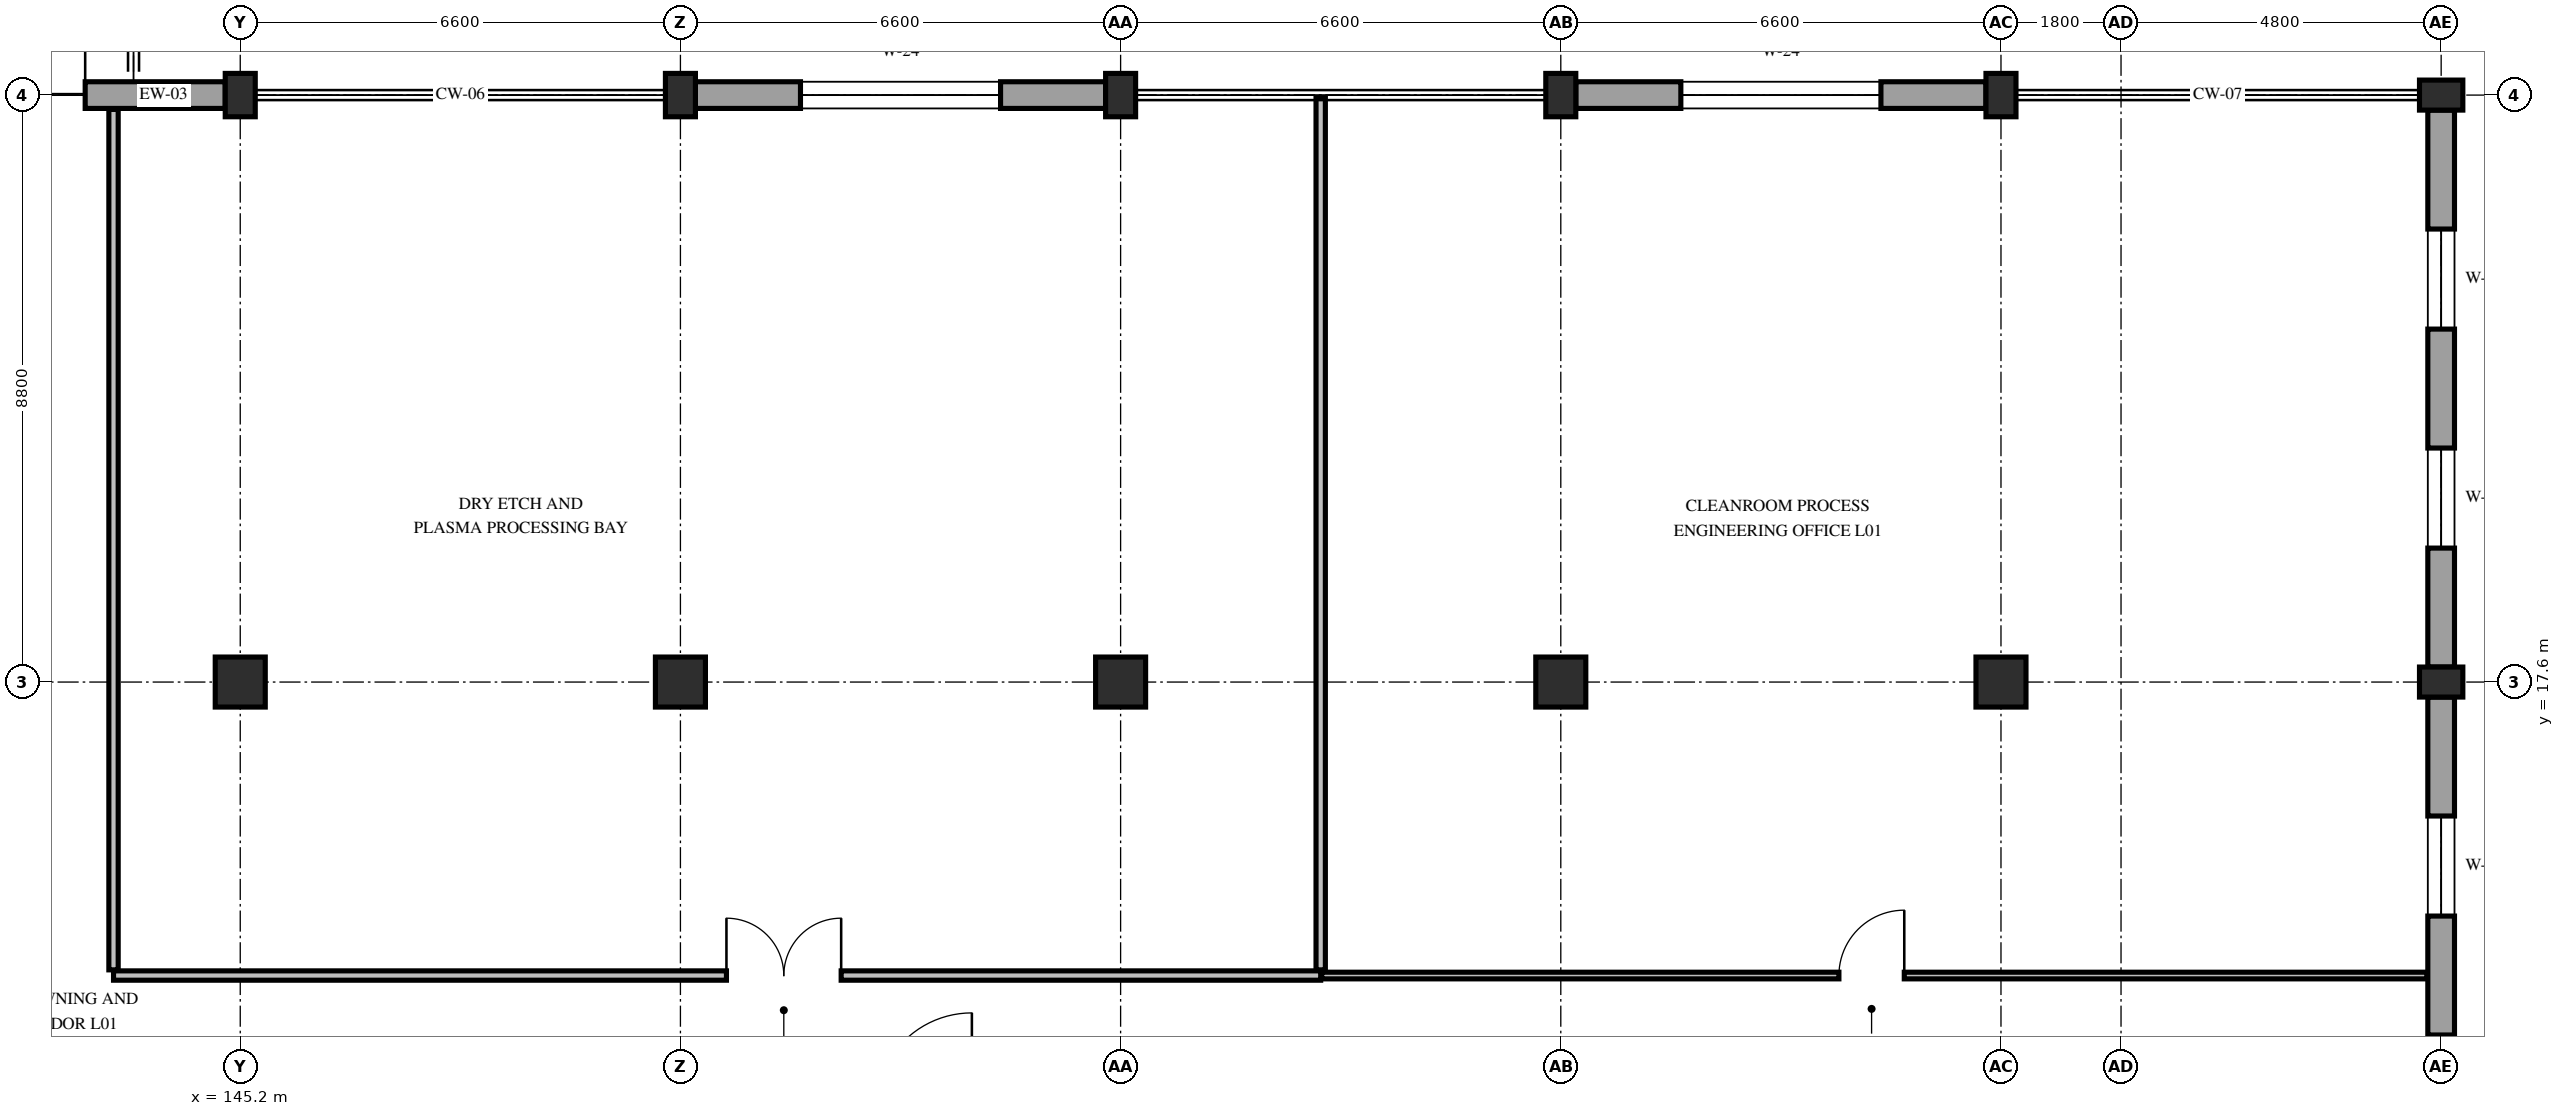
"""IFC4 building model, lengths in metres.
Left out: names, types, materials, properties, quantities, classifications, styles, units other than length and angle.
Written with IfcOpenShell. Run it as: python <this file> out.ifc"""

import sys

from ifc_helpers import new_model, si_unit, direction, frame, frame_2d, origin, origin_2d, place, context, subcontext, project, spatial, rectangle, extrude, element, fill, save


model = new_model("IFC4")
c1 = context("Model", 3, precision=1e-05, world=origin(), true_north=direction((0.0, 1.0)))
c2 = subcontext(c1, "Body", "Model", "MODEL_VIEW")
j1 = project(units=[si_unit("LENGTHUNIT", "METRE"), si_unit("PLANEANGLEUNIT", "RADIAN")], contexts=[c1])
p1 = place(None, origin())
s1 = spatial("IfcSite", under=j1, at=p1, CompositionType="ELEMENT")
p2 = place(p1, origin())
s2 = spatial("IfcBuilding", under=s1, at=p2, CompositionType="ELEMENT")
p3 = place(p2, frame((0.0, 0.0, 5.4)))
s3 = spatial("IfcBuildingStorey", under=s2, at=p3, CompositionType="ELEMENT", Elevation=5.4)
p4 = place(p3, frame((145.2, 17.6, 0.0), z_axis=(0.0, 0.0, 1.0), x_axis=(1.0, 0.0, 0.0)))
e1 = element("IfcColumn", 1, at=p4, inside=s3, PredefinedType="COLUMN", context=c2, shape_type="SweptSolid", body=[
    extrude(rectangle(XDim=0.75, YDim=0.75, at=origin_2d()), origin(), (0.0, 0.0, 1.0), 4.8),
])
p5 = place(p3, frame((145.2, 26.4, 0.0), z_axis=(0.0, 0.0, 1.0), x_axis=(1.0, 0.0, 0.0)))
e2 = element("IfcColumn", 2, at=p5, inside=s3, PredefinedType="PILASTER", context=c2, shape_type="SweptSolid", body=[
    extrude(rectangle(XDim=0.45, YDim=0.65, at=origin_2d()), origin(), (0.0, 0.0, 1.0), 4.8),
])
p6 = place(p3, frame((151.8, 17.6, 0.0), z_axis=(0.0, 0.0, 1.0), x_axis=(1.0, 0.0, 0.0)))
e3 = element("IfcColumn", 3, at=p6, inside=s3, PredefinedType="COLUMN", context=c2, shape_type="SweptSolid", body=[
    extrude(rectangle(XDim=0.75, YDim=0.75, at=origin_2d()), origin(), (0.0, 0.0, 1.0), 4.8),
])
p7 = place(p3, frame((151.8, 26.4, 0.0), z_axis=(0.0, 0.0, 1.0), x_axis=(1.0, 0.0, 0.0)))
e4 = element("IfcColumn", 4, at=p7, inside=s3, PredefinedType="PILASTER", context=c2, shape_type="SweptSolid", body=[
    extrude(rectangle(XDim=0.45, YDim=0.65, at=origin_2d()), origin(), (0.0, 0.0, 1.0), 4.8),
])
p8 = place(p3, frame((158.4, 17.6, 0.0), z_axis=(0.0, 0.0, 1.0), x_axis=(1.0, 0.0, 0.0)))
e5 = element("IfcColumn", 5, at=p8, inside=s3, PredefinedType="COLUMN", context=c2, shape_type="SweptSolid", body=[
    extrude(rectangle(XDim=0.75, YDim=0.75, at=origin_2d()), origin(), (0.0, 0.0, 1.0), 4.8),
])
p9 = place(p3, frame((158.4, 26.4, 0.0), z_axis=(0.0, 0.0, 1.0), x_axis=(1.0, 0.0, 0.0)))
e6 = element("IfcColumn", 6, at=p9, inside=s3, PredefinedType="PILASTER", context=c2, shape_type="SweptSolid", body=[
    extrude(rectangle(XDim=0.45, YDim=0.65, at=origin_2d()), origin(), (0.0, 0.0, 1.0), 4.8),
])
p10 = place(p3, frame((165.0, 17.6, 0.0), z_axis=(0.0, 0.0, 1.0), x_axis=(1.0, 0.0, 0.0)))
e7 = element("IfcColumn", 7, at=p10, inside=s3, PredefinedType="COLUMN", context=c2, shape_type="SweptSolid", body=[
    extrude(rectangle(XDim=0.75, YDim=0.75, at=origin_2d()), origin(), (0.0, 0.0, 1.0), 4.8),
])
p11 = place(p3, frame((165.0, 26.4, 0.0), z_axis=(0.0, 0.0, 1.0), x_axis=(1.0, 0.0, 0.0)))
e8 = element("IfcColumn", 8, at=p11, inside=s3, PredefinedType="PILASTER", context=c2, shape_type="SweptSolid", body=[
    extrude(rectangle(XDim=0.45, YDim=0.65, at=origin_2d()), origin(), (0.0, 0.0, 1.0), 4.8),
])
p12 = place(p3, frame((171.6, 17.6, 0.0), z_axis=(0.0, 0.0, 1.0), x_axis=(1.0, 0.0, 0.0)))
e9 = element("IfcColumn", 9, at=p12, inside=s3, PredefinedType="COLUMN", context=c2, shape_type="SweptSolid", body=[
    extrude(rectangle(XDim=0.75, YDim=0.75, at=origin_2d()), origin(), (0.0, 0.0, 1.0), 4.8),
])
for number, where, z_axis, x_axis in (
    (10, (171.6, 26.4, 0.0), (0.0, 0.0, 1.0), (1.0, 0.0, 0.0)),
    (11, (178.2, 17.6, 0.0), (0.0, 0.0, 1.0), (0.0, 1.0, 0.0)),
    (12, (178.2, 26.4, 0.0), (0.0, 0.0, 1.0), (0.0, 1.0, 0.0)),
):
    element("IfcColumn", number, at=place(p3, frame(where, z_axis=z_axis, x_axis=x_axis)), inside=s3, PredefinedType="PILASTER", context=c2, shape_type="SweptSolid", body=[
        extrude(rectangle(XDim=0.45, YDim=0.65, at=origin_2d()), origin(), (0.0, 0.0, 1.0), 4.8),
    ])
p13 = place(p3, frame((138.825, 26.4, 0.0), z_axis=(0.0, 0.0, 1.0), x_axis=(1.0, 0.0, 0.0)))
e13 = element("IfcWall", 13, at=p13, inside=s3, PredefinedType="STANDARD", context=c2, shape_type="SweptSolid", body=[
    extrude(rectangle(XDim=6.15, YDim=0.4, at=frame_2d((3.075, 0.0))), origin(), (0.0, 0.0, 1.0), 3.98),
])
p14 = place(p13, frame((2.1, 0.0, 0.0)))
e14 = element("IfcOpeningElement", 14, at=p14, cuts=e13, PredefinedType="OPENING", context=c2, shape_type="SweptSolid", body=[
    extrude(rectangle(XDim=1.95, YDim=2.35, at=frame_2d((0.975, 1.175))), frame((0.0, 0.215, 0.0), z_axis=(0.0, -1.0, 0.0), x_axis=(1.0, 0.0, 0.0)), (0.0, 0.0, 1.0), 0.43),
])
p15 = place(p3, frame((152.025, 26.4, 0.0), z_axis=(0.0, 0.0, 1.0), x_axis=(1.0, 0.0, 0.0)))
e15 = element("IfcWall", 15, at=p15, inside=s3, PredefinedType="STANDARD", context=c2, shape_type="SweptSolid", body=[
    extrude(rectangle(XDim=6.15, YDim=0.4, at=frame_2d((3.075, 0.0))), origin(), (0.0, 0.0, 1.0), 3.98),
])
p16 = place(p15, frame((1.575, 0.0, 0.85)))
e16 = element("IfcOpeningElement", 16, at=p16, cuts=e15, PredefinedType="OPENING", context=c2, shape_type="SweptSolid", body=[
    extrude(rectangle(XDim=3.0, YDim=1.7, at=frame_2d((1.5, 0.85))), frame((0.0, 0.215, 0.0), z_axis=(0.0, -1.0, 0.0), x_axis=(1.0, 0.0, 0.0)), (0.0, 0.0, 1.0), 0.43),
])
p17 = place(p3, frame((165.225, 26.4, 0.0), z_axis=(0.0, 0.0, 1.0), x_axis=(1.0, 0.0, 0.0)))
e17 = element("IfcWall", 17, at=p17, inside=s3, PredefinedType="STANDARD", context=c2, shape_type="SweptSolid", body=[
    extrude(rectangle(XDim=6.15, YDim=0.4, at=frame_2d((3.075, 0.0))), origin(), (0.0, 0.0, 1.0), 3.98),
])
p18 = place(p17, frame((1.575, 0.0, 0.85)))
e18 = element("IfcOpeningElement", 18, at=p18, cuts=e17, PredefinedType="OPENING", context=c2, shape_type="SweptSolid", body=[
    extrude(rectangle(XDim=3.0, YDim=1.7, at=frame_2d((1.5, 0.85))), frame((0.0, 0.215, 0.0), z_axis=(0.0, -1.0, 0.0), x_axis=(1.0, 0.0, 0.0)), (0.0, 0.0, 1.0), 0.43),
])
p19 = place(p3, frame((178.2, 26.175, 0.0), z_axis=(0.0, 0.0, 1.0), x_axis=(0.0, -1.0, 0.0)))
e19 = element("IfcWall", 19, at=p19, inside=s3, PredefinedType="STANDARD", context=c2, shape_type="SweptSolid", body=[
    extrude(rectangle(XDim=8.35, YDim=0.4, at=frame_2d((4.175, 0.0))), origin(), (0.0, 0.0, 1.0), 3.98),
])
p20 = place(p19, frame((1.783, 0.0, 0.85)))
e20 = element("IfcOpeningElement", 20, at=p20, cuts=e19, PredefinedType="OPENING", context=c2, shape_type="SweptSolid", body=[
    extrude(rectangle(XDim=1.5, YDim=1.88, at=frame_2d((0.75, 0.94))), frame((0.0, 0.215, 0.0), z_axis=(0.0, -1.0, 0.0), x_axis=(1.0, 0.0, 0.0)), (0.0, 0.0, 1.0), 0.43),
])
p21 = place(p19, frame((5.067, 0.0, 0.85)))
e21 = element("IfcOpeningElement", 21, at=p21, cuts=e19, PredefinedType="OPENING", context=c2, shape_type="SweptSolid", body=[
    extrude(rectangle(XDim=1.5, YDim=1.88, at=frame_2d((0.75, 0.94))), frame((0.0, 0.215, 0.0), z_axis=(0.0, -1.0, 0.0), x_axis=(1.0, 0.0, 0.0)), (0.0, 0.0, 1.0), 0.43),
])
p22 = place(p3, frame((178.2, 17.375, 0.0), z_axis=(0.0, 0.0, 1.0), x_axis=(0.0, -1.0, 0.0)))
e22 = element("IfcWall", 22, at=p22, inside=s3, PredefinedType="STANDARD", context=c2, shape_type="SweptSolid", body=[
    extrude(rectangle(XDim=8.35, YDim=0.4, at=frame_2d((4.175, 0.0))), origin(), (0.0, 0.0, 1.0), 3.98),
])
p23 = place(p22, frame((1.783, 0.0, 0.85)))
e23 = element("IfcOpeningElement", 23, at=p23, cuts=e22, PredefinedType="OPENING", context=c2, shape_type="SweptSolid", body=[
    extrude(rectangle(XDim=1.5, YDim=1.88, at=frame_2d((0.75, 0.94))), frame((0.0, 0.215, 0.0), z_axis=(0.0, -1.0, 0.0), x_axis=(1.0, 0.0, 0.0)), (0.0, 0.0, 1.0), 0.43),
])
p24 = place(p22, frame((5.067, 0.0, 0.85)))
e24 = element("IfcOpeningElement", 24, at=p24, cuts=e22, PredefinedType="OPENING", context=c2, shape_type="SweptSolid", body=[
    extrude(rectangle(XDim=1.5, YDim=1.88, at=frame_2d((0.75, 0.94))), frame((0.0, 0.215, 0.0), z_axis=(0.0, -1.0, 0.0), x_axis=(1.0, 0.0, 0.0)), (0.0, 0.0, 1.0), 0.43),
])
p25 = place(p3, frame((143.3, 13.2, 0.0), z_axis=(0.0, 0.0, 1.0), x_axis=(1.0, 0.0, 0.0)))
e25 = element("IfcWall", 25, at=p25, inside=s3, PredefinedType="PARTITIONING", context=c2, shape_type="SweptSolid", body=[
    extrude(rectangle(XDim=18.1, YDim=0.14, at=frame_2d((9.05, 0.0))), origin(), (0.0, 0.0, 1.0), 4.065),
])
p26 = place(p25, frame((9.19, 0.0, 0.0)))
e26 = element("IfcOpeningElement", 26, at=p26, cuts=e25, PredefinedType="OPENING", context=c2, shape_type="SweptSolid", body=[
    extrude(rectangle(XDim=1.72, YDim=2.35, at=frame_2d((0.86, 1.175))), frame((0.0, 0.085, 0.0), z_axis=(0.0, -1.0, 0.0), x_axis=(1.0, 0.0, 0.0)), (0.0, 0.0, 1.0), 0.17),
])
p27 = place(p3, frame((143.3, 13.285, 0.0), z_axis=(0.0, 0.0, 1.0), x_axis=(0.0, 1.0, 0.0)))
e27 = element("IfcWall", 27, at=p27, inside=s3, PredefinedType="PARTITIONING", context=c2, shape_type="SweptSolid", body=[
    extrude(rectangle(XDim=12.9, YDim=0.14, at=frame_2d((6.45, 0.0))), origin(), (0.0, 0.0, 1.0), 3.98),
])
p28 = place(p3, frame((161.4, 13.285, 0.0), z_axis=(0.0, 0.0, 1.0), x_axis=(0.0, 1.0, 0.0)))
e28 = element("IfcWall", 28, at=p28, inside=s3, PredefinedType="PARTITIONING", context=c2, shape_type="SweptSolid", body=[
    extrude(rectangle(XDim=13.075, YDim=0.14, at=frame_2d((6.538, 0.0))), origin(), (0.0, 0.0, 1.0), 3.98),
])
p29 = place(p3, frame((161.415, 13.2, 0.0), z_axis=(0.0, 0.0, 1.0), x_axis=(1.0, 0.0, 0.0)))
e29 = element("IfcWall", 29, at=p29, inside=s3, PredefinedType="PARTITIONING", context=c2, shape_type="SweptSolid", body=[
    extrude(rectangle(XDim=16.57, YDim=0.1, at=frame_2d((8.285, 0.0))), origin(), (0.0, 0.0, 1.0), 3.98),
])
p30 = place(p29, frame((7.755, 0.0, 0.0)))
e30 = element("IfcOpeningElement", 30, at=p30, cuts=e29, PredefinedType="OPENING", context=c2, shape_type="SweptSolid", body=[
    extrude(rectangle(XDim=0.98, YDim=2.2, at=frame_2d((0.49, 1.1))), frame((0.0, 0.065, 0.0), z_axis=(0.0, -1.0, 0.0), x_axis=(1.0, 0.0, 0.0)), (0.0, 0.0, 1.0), 0.13),
])
p31 = place(p14, origin())
e31 = element("IfcDoor", 31, at=p31, inside=s3, OperationType="DOUBLE_DOOR_SINGLE_SWING", PredefinedType="DOOR", context=c2, shape_type="SweptSolid", body=[
    extrude(rectangle(XDim=1.95, YDim=2.35, at=frame_2d((0.975, 1.175))), frame((0.0, 0.025, 0.0), z_axis=(0.0, -1.0, 0.0), x_axis=(1.0, 0.0, 0.0)), (0.0, 0.0, 1.0), 0.05),
])
fill(e14, e31)
p32 = place(p16, origin())
e32 = element("IfcWindow", 32, at=p32, inside=s3, PartitioningType="DOUBLE_PANEL_VERTICAL", PredefinedType="WINDOW", context=c2, shape_type="SweptSolid", body=[
    extrude(rectangle(XDim=3.0, YDim=1.7, at=frame_2d((1.5, 0.85))), frame((0.0, 0.03, 0.0), z_axis=(0.0, -1.0, 0.0), x_axis=(1.0, 0.0, 0.0)), (0.0, 0.0, 1.0), 0.06),
])
fill(e16, e32)
p33 = place(p18, origin())
e33 = element("IfcWindow", 33, at=p33, inside=s3, PartitioningType="DOUBLE_PANEL_VERTICAL", PredefinedType="WINDOW", context=c2, shape_type="SweptSolid", body=[
    extrude(rectangle(XDim=3.0, YDim=1.7, at=frame_2d((1.5, 0.85))), frame((0.0, 0.03, 0.0), z_axis=(0.0, -1.0, 0.0), x_axis=(1.0, 0.0, 0.0)), (0.0, 0.0, 1.0), 0.06),
])
fill(e18, e33)
p34 = place(p20, origin())
e34 = element("IfcWindow", 34, at=p34, inside=s3, PartitioningType="SINGLE_PANEL", PredefinedType="WINDOW", context=c2, shape_type="SweptSolid", body=[
    extrude(rectangle(XDim=1.5, YDim=1.88, at=frame_2d((0.75, 0.94))), frame((0.0, 0.03, 0.0), z_axis=(0.0, -1.0, 0.0), x_axis=(1.0, 0.0, 0.0)), (0.0, 0.0, 1.0), 0.06),
])
fill(e20, e34)
p35 = place(p21, origin())
e35 = element("IfcWindow", 35, at=p35, inside=s3, PartitioningType="SINGLE_PANEL", PredefinedType="WINDOW", context=c2, shape_type="SweptSolid", body=[
    extrude(rectangle(XDim=1.5, YDim=1.88, at=frame_2d((0.75, 0.94))), frame((0.0, 0.03, 0.0), z_axis=(0.0, -1.0, 0.0), x_axis=(1.0, 0.0, 0.0)), (0.0, 0.0, 1.0), 0.06),
])
fill(e21, e35)
p36 = place(p23, origin())
e36 = element("IfcWindow", 36, at=p36, inside=s3, PartitioningType="SINGLE_PANEL", PredefinedType="WINDOW", context=c2, shape_type="SweptSolid", body=[
    extrude(rectangle(XDim=1.5, YDim=1.88, at=frame_2d((0.75, 0.94))), frame((0.0, 0.03, 0.0), z_axis=(0.0, -1.0, 0.0), x_axis=(1.0, 0.0, 0.0)), (0.0, 0.0, 1.0), 0.06),
])
fill(e23, e36)
p37 = place(p24, origin())
e37 = element("IfcWindow", 37, at=p37, inside=s3, PartitioningType="SINGLE_PANEL", PredefinedType="WINDOW", context=c2, shape_type="SweptSolid", body=[
    extrude(rectangle(XDim=1.5, YDim=1.88, at=frame_2d((0.75, 0.94))), frame((0.0, 0.03, 0.0), z_axis=(0.0, -1.0, 0.0), x_axis=(1.0, 0.0, 0.0)), (0.0, 0.0, 1.0), 0.06),
])
fill(e24, e37)
p38 = place(p26, origin())
e38 = element("IfcDoor", 38, at=p38, inside=s3, OperationType="DOUBLE_DOOR_SINGLE_SWING", PredefinedType="DOOR", context=c2, shape_type="SweptSolid", body=[
    extrude(rectangle(XDim=1.72, YDim=2.35, at=frame_2d((0.86, 1.175))), frame((0.0, 0.025, 0.0), z_axis=(0.0, -1.0, 0.0), x_axis=(1.0, 0.0, 0.0)), (0.0, 0.0, 1.0), 0.05),
])
fill(e26, e38)
p39 = place(p30, origin())
e39 = element("IfcDoor", 39, at=p39, inside=s3, OperationType="SINGLE_SWING_RIGHT", PredefinedType="DOOR", context=c2, shape_type="SweptSolid", body=[
    extrude(rectangle(XDim=0.98, YDim=2.2, at=frame_2d((0.49, 1.1))), frame((0.0, 0.025, 0.0), z_axis=(0.0, -1.0, 0.0), x_axis=(1.0, 0.0, 0.0)), (0.0, 0.0, 1.0), 0.05),
])
fill(e30, e39)
save(model, sys.argv[1])
